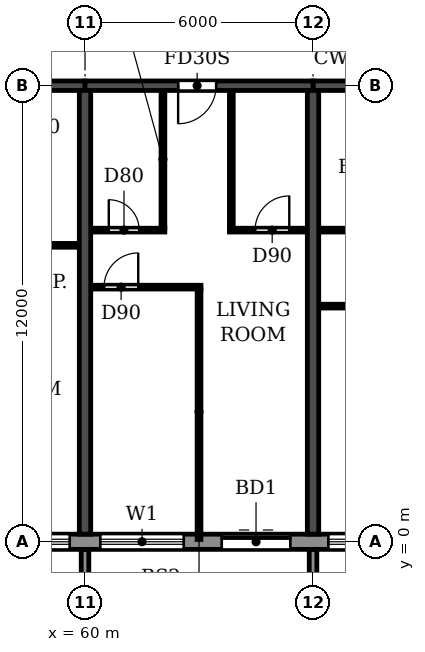
"""IFC4 building model, lengths in metres.
Left out: names, types, materials, properties, quantities, classifications, styles, units other than length and angle.
Written with IfcOpenShell. Run it as: python <this file> out.ifc"""

import sys

from ifc_helpers import new_model, si_unit, direction, frame, frame_2d, origin, place, context, subcontext, project, spatial, polyline, rectangle, outline, extrude, source, transform, mapped, element, fill, save


model = new_model("IFC4")
c1 = context("Model", 3, precision=1e-05, world=origin(), true_north=direction((0.0, 1.0)))
c2 = subcontext(c1, "Body", "Model", "MODEL_VIEW")
j1 = project(units=[si_unit("LENGTHUNIT", "METRE"), si_unit("PLANEANGLEUNIT", "RADIAN")], contexts=[c1])
p1 = place(None, origin())
s1 = spatial("IfcSite", under=j1, at=p1, CompositionType="ELEMENT")
p2 = place(p1, origin())
s2 = spatial("IfcBuilding", under=s1, at=p2, CompositionType="ELEMENT")
p3 = place(p2, frame((0.0, 0.0, 125.7)))
s3 = spatial("IfcBuildingStorey", under=s2, at=p3, CompositionType="ELEMENT", Elevation=125.7)
for number, where, z_axis, x_axis in (
    (1, (60.0, 0.2, 0.0), (0.0, 0.0, 1.0), (0.0, 1.0, 0.0)),
    (2, (66.0, 0.2, 0.0), (0.0, 0.0, 1.0), (0.0, 1.0, 0.0)),
):
    element("IfcWall", number, at=place(p3, frame(where, z_axis=z_axis, x_axis=x_axis)), inside=s3, PredefinedType="SHEAR", context=c2, shape_type="SweptSolid", body=[
        extrude(rectangle(XDim=11.675, YDim=0.3, at=frame_2d((5.837, 0.0))), origin(), (0.0, 0.0, 1.0), 3.07),
    ])
p4 = place(p3, frame((54.0, 12.0, 0.0), z_axis=(0.0, 0.0, 1.0), x_axis=(1.0, 0.0, 0.0)))
e3 = element("IfcWall", 3, at=p4, inside=s3, PredefinedType="SHEAR", context=c2, shape_type="SweptSolid", body=[
    extrude(rectangle(XDim=6.0, YDim=0.25, at=frame_2d((3.0, 0.0))), origin(), (0.0, 0.0, 1.0), 2.47),
])
p5 = place(p4, frame((2.45, 0.0, 0.0)))
e4 = element("IfcOpeningElement", 4, at=p5, cuts=e3, PredefinedType="OPENING", context=c2, shape_type="SweptSolid", body=[
    extrude(rectangle(XDim=1.0, YDim=2.1, at=frame_2d((0.5, 1.05))), frame((0.0, 0.135, 0.0), z_axis=(0.0, -1.0, 0.0), x_axis=(1.0, 0.0, 0.0)), (0.0, 0.0, 1.0), 0.27),
])
p6 = place(p3, frame((60.0, 12.0, 0.0), z_axis=(0.0, 0.0, 1.0), x_axis=(1.0, 0.0, 0.0)))
e5 = element("IfcWall", 5, at=p6, inside=s3, PredefinedType="SHEAR", context=c2, shape_type="SweptSolid", body=[
    extrude(rectangle(XDim=6.0, YDim=0.25, at=frame_2d((3.0, 0.0))), origin(), (0.0, 0.0, 1.0), 2.47),
])
p7 = place(p6, frame((2.45, 0.0, 0.0)))
e6 = element("IfcOpeningElement", 6, at=p7, cuts=e5, PredefinedType="OPENING", context=c2, shape_type="SweptSolid", body=[
    extrude(rectangle(XDim=1.0, YDim=2.1, at=frame_2d((0.5, 1.05))), frame((0.0, 0.135, 0.0), z_axis=(0.0, -1.0, 0.0), x_axis=(1.0, 0.0, 0.0)), (0.0, 0.0, 1.0), 0.27),
])
p8 = place(p3, frame((66.0, 12.0, 0.0), z_axis=(0.0, 0.0, 1.0), x_axis=(1.0, 0.0, 0.0)))
e7 = element("IfcWall", 7, at=p8, inside=s3, PredefinedType="SHEAR", context=c2, shape_type="SweptSolid", body=[
    extrude(rectangle(XDim=6.0, YDim=0.25, at=frame_2d((3.0, 0.0))), origin(), (0.0, 0.0, 1.0), 2.47),
])
p9 = place(p3, frame((16.683, 0.0, 0.0), z_axis=(0.0, 0.0, 1.0), x_axis=(1.0, 0.0, 0.0)))
e8 = element("IfcWall", 8, at=p9, inside=s3, PredefinedType="STANDARD", context=c2, shape_type="SweptSolid", body=[
    extrude(rectangle(XDim=68.634, YDim=0.4, at=frame_2d((34.317, 0.0))), origin(), (0.0, 0.0, 1.0), 3.07),
])
p10 = place(p9, frame((1.717, 0.0, 0.9)))
e9 = element("IfcOpeningElement", 9, at=p10, cuts=e8, PredefinedType="OPENING", context=c2, shape_type="SweptSolid", body=[
    extrude(rectangle(XDim=2.2, YDim=1.5, at=frame_2d((1.1, 0.75))), frame((0.0, 0.21, 0.0), z_axis=(0.0, -1.0, 0.0), x_axis=(1.0, 0.0, 0.0)), (0.0, 0.0, 1.0), 0.42),
])
p11 = place(p9, frame((4.717, 0.0, 0.9)))
e10 = element("IfcOpeningElement", 10, at=p11, cuts=e8, PredefinedType="OPENING", context=c2, shape_type="SweptSolid", body=[
    extrude(rectangle(XDim=2.2, YDim=1.5, at=frame_2d((1.1, 0.75))), frame((0.0, 0.21, 0.0), z_axis=(0.0, -1.0, 0.0), x_axis=(1.0, 0.0, 0.0)), (0.0, 0.0, 1.0), 0.42),
])
p12 = place(p9, frame((7.717, 0.0, 0.9)))
e11 = element("IfcOpeningElement", 11, at=p12, cuts=e8, PredefinedType="OPENING", context=c2, shape_type="SweptSolid", body=[
    extrude(rectangle(XDim=2.2, YDim=1.5, at=frame_2d((1.1, 0.75))), frame((0.0, 0.21, 0.0), z_axis=(0.0, -1.0, 0.0), x_axis=(1.0, 0.0, 0.0)), (0.0, 0.0, 1.0), 0.42),
])
p13 = place(p9, frame((10.717, 0.0, 0.9)))
e12 = element("IfcOpeningElement", 12, at=p13, cuts=e8, PredefinedType="OPENING", context=c2, shape_type="SweptSolid", body=[
    extrude(rectangle(XDim=2.2, YDim=1.5, at=frame_2d((1.1, 0.75))), frame((0.0, 0.21, 0.0), z_axis=(0.0, -1.0, 0.0), x_axis=(1.0, 0.0, 0.0)), (0.0, 0.0, 1.0), 0.42),
])
p14 = place(p9, frame((13.717, 0.0, 0.9)))
e13 = element("IfcOpeningElement", 13, at=p14, cuts=e8, PredefinedType="OPENING", context=c2, shape_type="SweptSolid", body=[
    extrude(rectangle(XDim=2.2, YDim=1.5, at=frame_2d((1.1, 0.75))), frame((0.0, 0.21, 0.0), z_axis=(0.0, -1.0, 0.0), x_axis=(1.0, 0.0, 0.0)), (0.0, 0.0, 1.0), 0.42),
])
p15 = place(p9, frame((16.717, 0.0, 0.9)))
e14 = element("IfcOpeningElement", 14, at=p15, cuts=e8, PredefinedType="OPENING", context=c2, shape_type="SweptSolid", body=[
    extrude(rectangle(XDim=2.2, YDim=1.5, at=frame_2d((1.1, 0.75))), frame((0.0, 0.21, 0.0), z_axis=(0.0, -1.0, 0.0), x_axis=(1.0, 0.0, 0.0)), (0.0, 0.0, 1.0), 0.42),
])
p16 = place(p9, frame((19.717, 0.0, 0.9)))
e15 = element("IfcOpeningElement", 15, at=p16, cuts=e8, PredefinedType="OPENING", context=c2, shape_type="SweptSolid", body=[
    extrude(rectangle(XDim=2.2, YDim=1.5, at=frame_2d((1.1, 0.75))), frame((0.0, 0.21, 0.0), z_axis=(0.0, -1.0, 0.0), x_axis=(1.0, 0.0, 0.0)), (0.0, 0.0, 1.0), 0.42),
])
p17 = place(p9, frame((22.917, 0.0, 0.0)))
e16 = element("IfcOpeningElement", 16, at=p17, cuts=e8, PredefinedType="OPENING", context=c2, shape_type="SweptSolid", body=[
    extrude(rectangle(XDim=1.8, YDim=2.4, at=frame_2d((0.9, 1.2))), frame((0.0, 0.21, 0.0), z_axis=(0.0, -1.0, 0.0), x_axis=(1.0, 0.0, 0.0)), (0.0, 0.0, 1.0), 0.42),
])
p18 = place(p9, frame((25.717, 0.0, 0.9)))
e17 = element("IfcOpeningElement", 17, at=p18, cuts=e8, PredefinedType="OPENING", context=c2, shape_type="SweptSolid", body=[
    extrude(rectangle(XDim=2.2, YDim=1.5, at=frame_2d((1.1, 0.75))), frame((0.0, 0.21, 0.0), z_axis=(0.0, -1.0, 0.0), x_axis=(1.0, 0.0, 0.0)), (0.0, 0.0, 1.0), 0.42),
])
p19 = place(p9, frame((28.717, 0.0, 0.9)))
e18 = element("IfcOpeningElement", 18, at=p19, cuts=e8, PredefinedType="OPENING", context=c2, shape_type="SweptSolid", body=[
    extrude(rectangle(XDim=2.2, YDim=1.5, at=frame_2d((1.1, 0.75))), frame((0.0, 0.21, 0.0), z_axis=(0.0, -1.0, 0.0), x_axis=(1.0, 0.0, 0.0)), (0.0, 0.0, 1.0), 0.42),
])
p20 = place(p9, frame((31.717, 0.0, 0.9)))
e19 = element("IfcOpeningElement", 19, at=p20, cuts=e8, PredefinedType="OPENING", context=c2, shape_type="SweptSolid", body=[
    extrude(rectangle(XDim=2.2, YDim=1.5, at=frame_2d((1.1, 0.75))), frame((0.0, 0.21, 0.0), z_axis=(0.0, -1.0, 0.0), x_axis=(1.0, 0.0, 0.0)), (0.0, 0.0, 1.0), 0.42),
])
p21 = place(p9, frame((34.917, 0.0, 0.0)))
e20 = element("IfcOpeningElement", 20, at=p21, cuts=e8, PredefinedType="OPENING", context=c2, shape_type="SweptSolid", body=[
    extrude(rectangle(XDim=1.8, YDim=2.4, at=frame_2d((0.9, 1.2))), frame((0.0, 0.21, 0.0), z_axis=(0.0, -1.0, 0.0), x_axis=(1.0, 0.0, 0.0)), (0.0, 0.0, 1.0), 0.42),
])
p22 = place(p9, frame((37.717, 0.0, 0.9)))
e21 = element("IfcOpeningElement", 21, at=p22, cuts=e8, PredefinedType="OPENING", context=c2, shape_type="SweptSolid", body=[
    extrude(rectangle(XDim=2.2, YDim=1.5, at=frame_2d((1.1, 0.75))), frame((0.0, 0.21, 0.0), z_axis=(0.0, -1.0, 0.0), x_axis=(1.0, 0.0, 0.0)), (0.0, 0.0, 1.0), 0.42),
])
p23 = place(p9, frame((40.717, 0.0, 0.9)))
e22 = element("IfcOpeningElement", 22, at=p23, cuts=e8, PredefinedType="OPENING", context=c2, shape_type="SweptSolid", body=[
    extrude(rectangle(XDim=2.2, YDim=1.5, at=frame_2d((1.1, 0.75))), frame((0.0, 0.21, 0.0), z_axis=(0.0, -1.0, 0.0), x_axis=(1.0, 0.0, 0.0)), (0.0, 0.0, 1.0), 0.42),
])
p24 = place(p9, frame((43.717, 0.0, 0.9)))
e23 = element("IfcOpeningElement", 23, at=p24, cuts=e8, PredefinedType="OPENING", context=c2, shape_type="SweptSolid", body=[
    extrude(rectangle(XDim=2.2, YDim=1.5, at=frame_2d((1.1, 0.75))), frame((0.0, 0.21, 0.0), z_axis=(0.0, -1.0, 0.0), x_axis=(1.0, 0.0, 0.0)), (0.0, 0.0, 1.0), 0.42),
])
p25 = place(p9, frame((46.917, 0.0, 0.0)))
e24 = element("IfcOpeningElement", 24, at=p25, cuts=e8, PredefinedType="OPENING", context=c2, shape_type="SweptSolid", body=[
    extrude(rectangle(XDim=1.8, YDim=2.4, at=frame_2d((0.9, 1.2))), frame((0.0, 0.21, 0.0), z_axis=(0.0, -1.0, 0.0), x_axis=(1.0, 0.0, 0.0)), (0.0, 0.0, 1.0), 0.42),
])
p26 = place(p9, frame((49.717, 0.0, 0.9)))
e25 = element("IfcOpeningElement", 25, at=p26, cuts=e8, PredefinedType="OPENING", context=c2, shape_type="SweptSolid", body=[
    extrude(rectangle(XDim=2.2, YDim=1.5, at=frame_2d((1.1, 0.75))), frame((0.0, 0.21, 0.0), z_axis=(0.0, -1.0, 0.0), x_axis=(1.0, 0.0, 0.0)), (0.0, 0.0, 1.0), 0.42),
])
p27 = place(p9, frame((52.717, 0.0, 0.9)))
e26 = element("IfcOpeningElement", 26, at=p27, cuts=e8, PredefinedType="OPENING", context=c2, shape_type="SweptSolid", body=[
    extrude(rectangle(XDim=2.2, YDim=1.5, at=frame_2d((1.1, 0.75))), frame((0.0, 0.21, 0.0), z_axis=(0.0, -1.0, 0.0), x_axis=(1.0, 0.0, 0.0)), (0.0, 0.0, 1.0), 0.42),
])
p28 = place(p9, frame((55.717, 0.0, 0.9)))
e27 = element("IfcOpeningElement", 27, at=p28, cuts=e8, PredefinedType="OPENING", context=c2, shape_type="SweptSolid", body=[
    extrude(rectangle(XDim=2.2, YDim=1.5, at=frame_2d((1.1, 0.75))), frame((0.0, 0.21, 0.0), z_axis=(0.0, -1.0, 0.0), x_axis=(1.0, 0.0, 0.0)), (0.0, 0.0, 1.0), 0.42),
])
p29 = place(p9, frame((58.917, 0.0, 0.0)))
e28 = element("IfcOpeningElement", 28, at=p29, cuts=e8, PredefinedType="OPENING", context=c2, shape_type="SweptSolid", body=[
    extrude(rectangle(XDim=1.8, YDim=2.4, at=frame_2d((0.9, 1.2))), frame((0.0, 0.21, 0.0), z_axis=(0.0, -1.0, 0.0), x_axis=(1.0, 0.0, 0.0)), (0.0, 0.0, 1.0), 0.42),
])
p30 = place(p9, frame((61.717, 0.0, 0.9)))
e29 = element("IfcOpeningElement", 29, at=p30, cuts=e8, PredefinedType="OPENING", context=c2, shape_type="SweptSolid", body=[
    extrude(rectangle(XDim=2.2, YDim=1.5, at=frame_2d((1.1, 0.75))), frame((0.0, 0.21, 0.0), z_axis=(0.0, -1.0, 0.0), x_axis=(1.0, 0.0, 0.0)), (0.0, 0.0, 1.0), 0.42),
])
p31 = place(p9, frame((64.717, 0.0, 0.9)))
e30 = element("IfcOpeningElement", 30, at=p31, cuts=e8, PredefinedType="OPENING", context=c2, shape_type="SweptSolid", body=[
    extrude(rectangle(XDim=2.2, YDim=1.5, at=frame_2d((1.1, 0.75))), frame((0.0, 0.21, 0.0), z_axis=(0.0, -1.0, 0.0), x_axis=(1.0, 0.0, 0.0)), (0.0, 0.0, 1.0), 0.42),
])
m1 = source(origin(), c2, "Body", "SweptSolid", [
    extrude(outline(polyline([(0.0, 0.0), (0.2, 0.0), (0.2, 1.65), (0.0, 1.65), (0.0, 0.0)])), origin(), (0.0, 0.0, 1.0), 3.1),
])
for number, where in (
    (31, (59.9, -1.85, 0.0)),
    (32, (65.9, -1.85, 0.0)),
):
    element("IfcWall", number, at=place(p3, frame(where)), inside=s3, PredefinedType="STANDARD", context=c2, shape_type="MappedRepresentation", body=[
        mapped(m1, transform((0.0, 0.0, 0.0))),
    ])
p32 = place(p3, frame((66.16, 6.2, 0.0), z_axis=(0.0, 0.0, 1.0), x_axis=(1.0, 0.0, 0.0)))
e33 = element("IfcWall", 33, at=p32, inside=s3, PredefinedType="PARTITIONING", context=c2, shape_type="SweptSolid", body=[
    extrude(rectangle(XDim=5.68, YDim=0.1, at=frame_2d((2.84, 0.0))), origin(), (0.0, 0.0, 1.0), 3.07),
])
p33 = place(p32, frame((1.44, 0.0, 0.0)))
e34 = element("IfcOpeningElement", 34, at=p33, cuts=e33, PredefinedType="OPENING", context=c2, shape_type="SweptSolid", body=[
    extrude(rectangle(XDim=0.9, YDim=2.1, at=frame_2d((0.45, 1.05))), frame((0.0, 0.06, 0.0), z_axis=(0.0, -1.0, 0.0), x_axis=(1.0, 0.0, 0.0)), (0.0, 0.0, 1.0), 0.12),
])
p34 = place(p32, frame((3.34, 0.0, 0.0)))
e35 = element("IfcOpeningElement", 35, at=p34, cuts=e33, PredefinedType="OPENING", context=c2, shape_type="SweptSolid", body=[
    extrude(rectangle(XDim=0.9, YDim=2.1, at=frame_2d((0.45, 1.05))), frame((0.0, 0.06, 0.0), z_axis=(0.0, -1.0, 0.0), x_axis=(1.0, 0.0, 0.0)), (0.0, 0.0, 1.0), 0.12),
])
p35 = place(p3, frame((60.16, 6.7, 0.0), z_axis=(0.0, 0.0, 1.0), x_axis=(1.0, 0.0, 0.0)))
e36 = element("IfcWall", 36, at=p35, inside=s3, PredefinedType="PARTITIONING", context=c2, shape_type="SweptSolid", body=[
    extrude(rectangle(XDim=2.89, YDim=0.1, at=frame_2d((1.445, 0.0))), origin(), (0.0, 0.0, 1.0), 3.07),
])
p36 = place(p35, frame((0.34, 0.0, 0.0)))
e37 = element("IfcOpeningElement", 37, at=p36, cuts=e36, PredefinedType="OPENING", context=c2, shape_type="SweptSolid", body=[
    extrude(rectangle(XDim=0.9, YDim=2.1, at=frame_2d((0.45, 1.05))), frame((0.0, 0.06, 0.0), z_axis=(0.0, -1.0, 0.0), x_axis=(1.0, 0.0, 0.0)), (0.0, 0.0, 1.0), 0.12),
])
p37 = place(p3, frame((57.8, 7.8, 0.0), z_axis=(0.0, 0.0, 1.0), x_axis=(1.0, 0.0, 0.0)))
e38 = element("IfcWall", 38, at=p37, inside=s3, PredefinedType="PARTITIONING", context=c2, shape_type="SweptSolid", body=[
    extrude(rectangle(XDim=2.04, YDim=0.1, at=frame_2d((1.02, 0.0))), origin(), (0.0, 0.0, 1.0), 3.07),
])
p38 = place(p3, frame((60.16, 8.2, 0.0), z_axis=(0.0, 0.0, 1.0), x_axis=(1.0, 0.0, 0.0)))
e39 = element("IfcWall", 39, at=p38, inside=s3, PredefinedType="PARTITIONING", context=c2, shape_type="SweptSolid", body=[
    extrude(rectangle(XDim=1.94, YDim=0.1, at=frame_2d((0.97, 0.0))), origin(), (0.0, 0.0, 1.0), 3.07),
])
p39 = place(p38, frame((0.465, 0.0, 0.0)))
e40 = element("IfcOpeningElement", 40, at=p39, cuts=e39, PredefinedType="OPENING", context=c2, shape_type="SweptSolid", body=[
    extrude(rectangle(XDim=0.8, YDim=2.1, at=frame_2d((0.4, 1.05))), frame((0.0, 0.06, 0.0), z_axis=(0.0, -1.0, 0.0), x_axis=(1.0, 0.0, 0.0)), (0.0, 0.0, 1.0), 0.12),
])
p40 = place(p3, frame((63.8, 8.2, 0.0), z_axis=(0.0, 0.0, 1.0), x_axis=(1.0, 0.0, 0.0)))
e41 = element("IfcWall", 41, at=p40, inside=s3, PredefinedType="PARTITIONING", context=c2, shape_type="SweptSolid", body=[
    extrude(rectangle(XDim=2.04, YDim=0.1, at=frame_2d((1.02, 0.0))), origin(), (0.0, 0.0, 1.0), 3.07),
])
p41 = place(p40, frame((0.675, 0.0, 0.0)))
e42 = element("IfcOpeningElement", 42, at=p41, cuts=e41, PredefinedType="OPENING", context=c2, shape_type="SweptSolid", body=[
    extrude(rectangle(XDim=0.9, YDim=2.1, at=frame_2d((0.45, 1.05))), frame((0.0, 0.06, 0.0), z_axis=(0.0, -1.0, 0.0), x_axis=(1.0, 0.0, 0.0)), (0.0, 0.0, 1.0), 0.12),
])
p42 = place(p3, frame((66.16, 8.2, 0.0), z_axis=(0.0, 0.0, 1.0), x_axis=(1.0, 0.0, 0.0)))
e43 = element("IfcWall", 43, at=p42, inside=s3, PredefinedType="PARTITIONING", context=c2, shape_type="SweptSolid", body=[
    extrude(rectangle(XDim=3.19, YDim=0.1, at=frame_2d((1.595, 0.0))), origin(), (0.0, 0.0, 1.0), 3.07),
])
p43 = place(p42, frame((1.09, 0.0, 0.0)))
e44 = element("IfcOpeningElement", 44, at=p43, cuts=e43, PredefinedType="OPENING", context=c2, shape_type="SweptSolid", body=[
    extrude(rectangle(XDim=0.8, YDim=2.1, at=frame_2d((0.4, 1.05))), frame((0.0, 0.06, 0.0), z_axis=(0.0, -1.0, 0.0), x_axis=(1.0, 0.0, 0.0)), (0.0, 0.0, 1.0), 0.12),
])
p44 = place(p3, frame((62.05, 8.25, 0.0), z_axis=(0.0, 0.0, 1.0), x_axis=(0.0, 1.0, 0.0)))
e45 = element("IfcWall", 45, at=p44, inside=s3, PredefinedType="PARTITIONING", context=c2, shape_type="SweptSolid", body=[
    extrude(rectangle(XDim=3.615, YDim=0.1, at=frame_2d((1.808, 0.0))), origin(), (0.0, 0.0, 1.0), 3.07),
])
p45 = place(p3, frame((63.0, 0.06, 0.0), z_axis=(0.0, 0.0, 1.0), x_axis=(0.0, 1.0, 0.0)))
e46 = element("IfcWall", 46, at=p45, inside=s3, PredefinedType="PARTITIONING", context=c2, shape_type="SweptSolid", body=[
    extrude(rectangle(XDim=6.59, YDim=0.1, at=frame_2d((3.295, 0.0))), origin(), (0.0, 0.0, 1.0), 3.07),
])
p46 = place(p3, frame((63.85, 8.25, 0.0), z_axis=(0.0, 0.0, 1.0), x_axis=(0.0, 1.0, 0.0)))
e47 = element("IfcWall", 47, at=p46, inside=s3, PredefinedType="PARTITIONING", context=c2, shape_type="SweptSolid", body=[
    extrude(rectangle(XDim=3.615, YDim=0.1, at=frame_2d((1.808, 0.0))), origin(), (0.0, 0.0, 1.0), 3.07),
])
p47 = place(p23, origin())
e48 = element("IfcWindow", 48, at=p47, inside=s3, PartitioningType="DOUBLE_PANEL_HORIZONTAL", PredefinedType="WINDOW", context=c2, shape_type="SweptSolid", body=[
    extrude(rectangle(XDim=2.2, YDim=1.5, at=frame_2d((1.1, 0.75))), frame((0.0, 0.03, 0.0), z_axis=(0.0, -1.0, 0.0), x_axis=(1.0, 0.0, 0.0)), (0.0, 0.0, 1.0), 0.06),
])
fill(e22, e48)
p48 = place(p24, origin())
e49 = element("IfcWindow", 49, at=p48, inside=s3, PartitioningType="DOUBLE_PANEL_HORIZONTAL", PredefinedType="WINDOW", context=c2, shape_type="SweptSolid", body=[
    extrude(rectangle(XDim=2.2, YDim=1.5, at=frame_2d((1.1, 0.75))), frame((0.0, 0.03, 0.0), z_axis=(0.0, -1.0, 0.0), x_axis=(1.0, 0.0, 0.0)), (0.0, 0.0, 1.0), 0.06),
])
fill(e23, e49)
p49 = place(p25, origin())
e50 = element("IfcDoor", 50, at=p49, inside=s3, OperationType="DOUBLE_DOOR_SLIDING", PredefinedType="DOOR", context=c2, shape_type="SweptSolid", body=[
    extrude(rectangle(XDim=1.8, YDim=2.4, at=frame_2d((0.9, 1.2))), frame((0.0, 0.025, 0.0), z_axis=(0.0, -1.0, 0.0), x_axis=(1.0, 0.0, 0.0)), (0.0, 0.0, 1.0), 0.05),
])
fill(e24, e50)
p50 = place(p26, origin())
e51 = element("IfcWindow", 51, at=p50, inside=s3, PartitioningType="DOUBLE_PANEL_HORIZONTAL", PredefinedType="WINDOW", context=c2, shape_type="SweptSolid", body=[
    extrude(rectangle(XDim=2.2, YDim=1.5, at=frame_2d((1.1, 0.75))), frame((0.0, 0.03, 0.0), z_axis=(0.0, -1.0, 0.0), x_axis=(1.0, 0.0, 0.0)), (0.0, 0.0, 1.0), 0.06),
])
fill(e25, e51)
p51 = place(p36, origin())
e52 = element("IfcDoor", 52, at=p51, inside=s3, OperationType="SINGLE_SWING_RIGHT", PredefinedType="DOOR", context=c2, shape_type="SweptSolid", body=[
    extrude(rectangle(XDim=0.9, YDim=2.1, at=frame_2d((0.45, 1.05))), frame((0.0, 0.025, 0.0), z_axis=(0.0, -1.0, 0.0), x_axis=(1.0, 0.0, 0.0)), (0.0, 0.0, 1.0), 0.05),
])
fill(e37, e52)
p52 = place(p39, origin())
e53 = element("IfcDoor", 53, at=p52, inside=s3, OperationType="SINGLE_SWING_LEFT", PredefinedType="DOOR", context=c2, shape_type="SweptSolid", body=[
    extrude(rectangle(XDim=0.8, YDim=2.1, at=frame_2d((0.4, 1.05))), frame((0.0, 0.025, 0.0), z_axis=(0.0, -1.0, 0.0), x_axis=(1.0, 0.0, 0.0)), (0.0, 0.0, 1.0), 0.05),
])
fill(e40, e53)
p53 = place(p7, frame((1.0, 0.0, 0.0), z_axis=(0.0, 0.0, 1.0), x_axis=(-1.0, 0.0, 0.0)))
e54 = element("IfcDoor", 54, at=p53, inside=s3, OperationType="SINGLE_SWING_RIGHT", PredefinedType="DOOR", context=c2, shape_type="SweptSolid", body=[
    extrude(rectangle(XDim=1.0, YDim=2.1, at=frame_2d((0.5, 1.05))), frame((0.0, 0.025, 0.0), z_axis=(0.0, -1.0, 0.0), x_axis=(1.0, 0.0, 0.0)), (0.0, 0.0, 1.0), 0.05),
])
fill(e6, e54)
p54 = place(p41, origin())
e55 = element("IfcDoor", 55, at=p54, inside=s3, OperationType="SINGLE_SWING_RIGHT", PredefinedType="DOOR", context=c2, shape_type="SweptSolid", body=[
    extrude(rectangle(XDim=0.9, YDim=2.1, at=frame_2d((0.45, 1.05))), frame((0.0, 0.025, 0.0), z_axis=(0.0, -1.0, 0.0), x_axis=(1.0, 0.0, 0.0)), (0.0, 0.0, 1.0), 0.05),
])
fill(e42, e55)
save(model, sys.argv[1])
